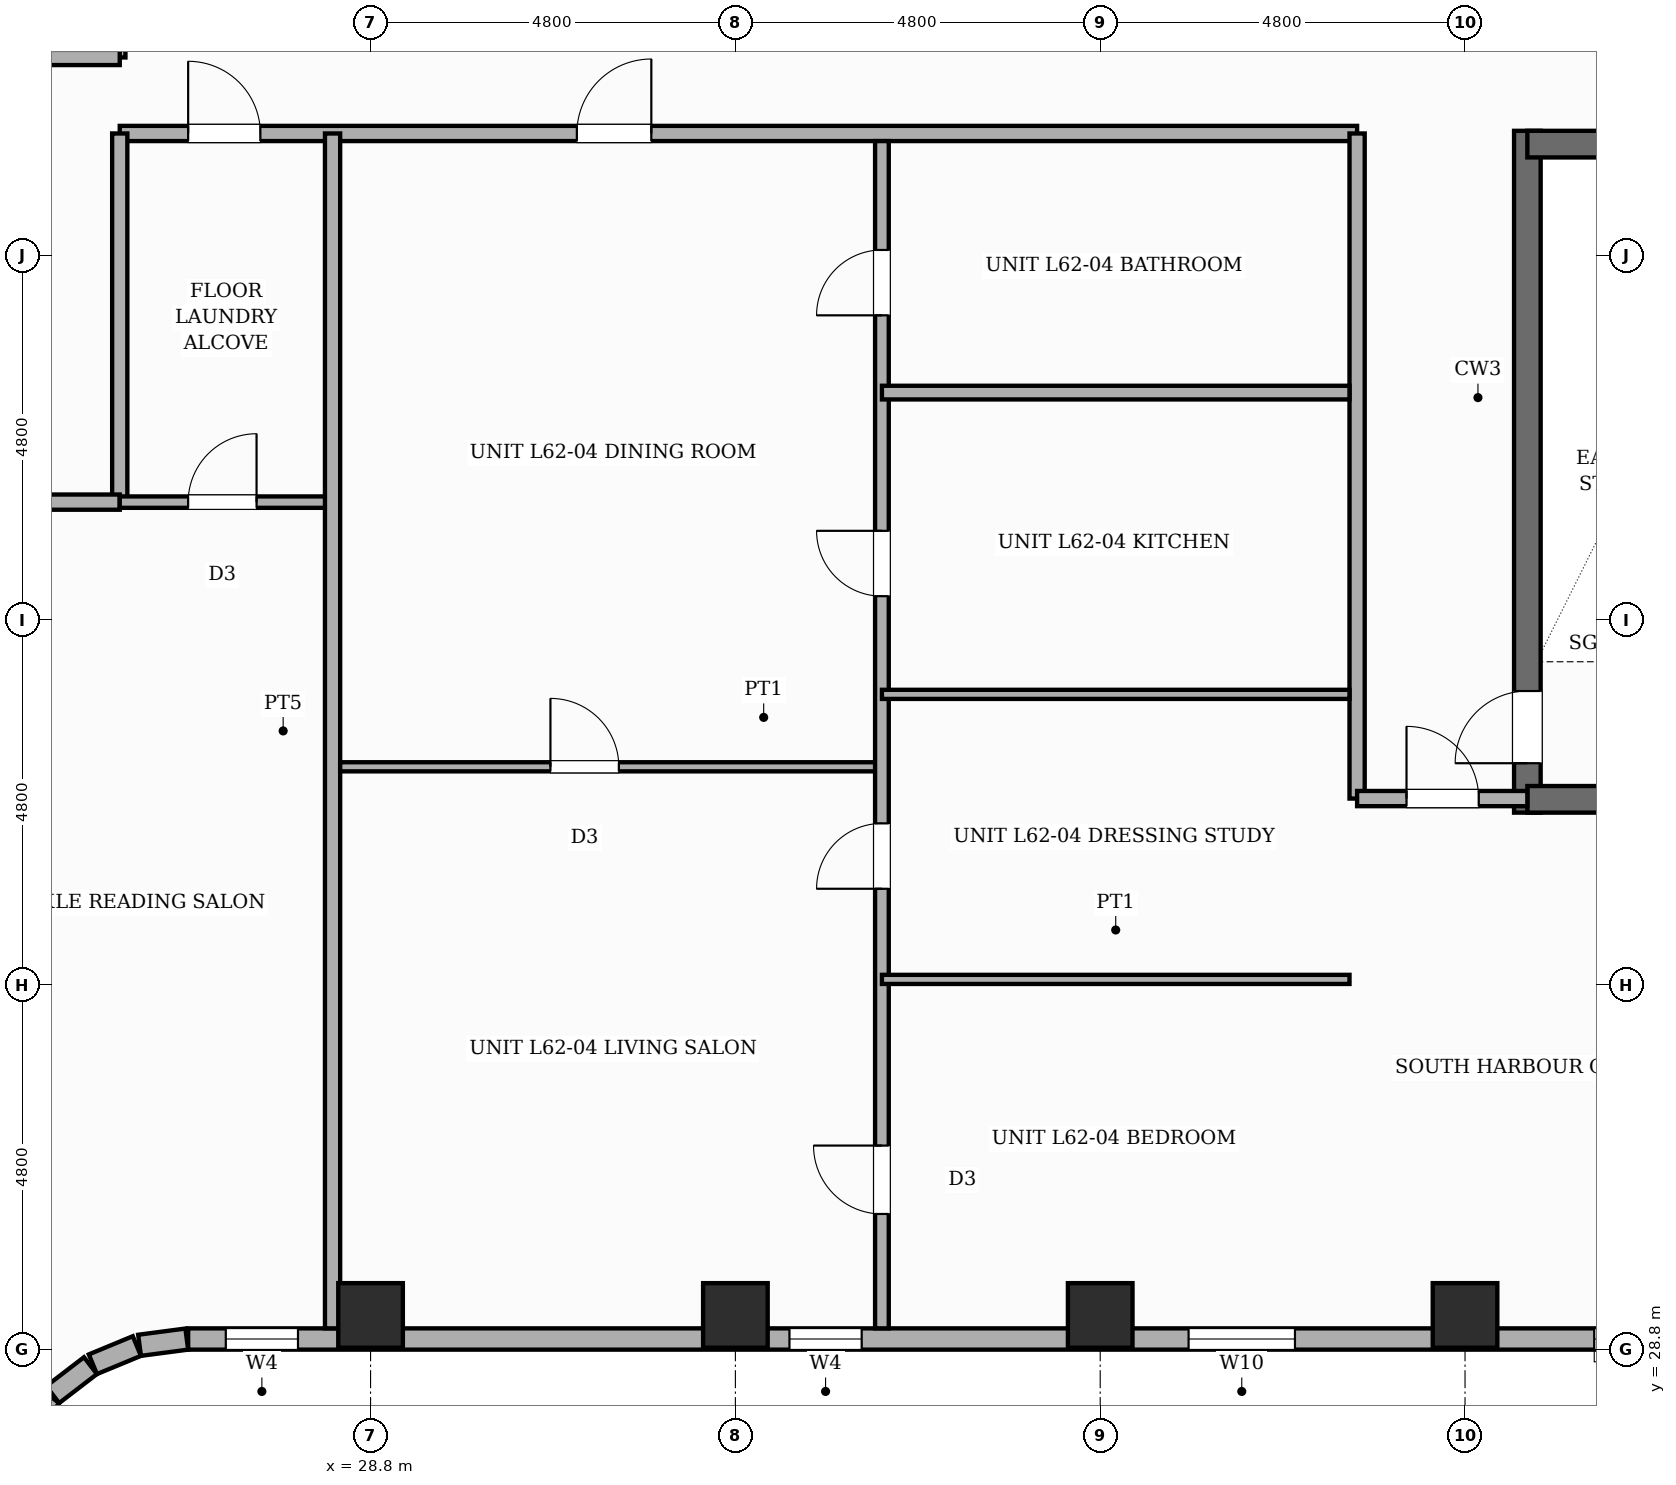
"""IFC4 building model, lengths in metres.
Left out: names, types, materials, properties, quantities, classifications, styles, units other than length and angle.
Written with IfcOpenShell. Run it as: python <this file> out.ifc"""

import sys

from ifc_helpers import new_model, si_unit, direction, frame, frame_2d, origin, origin_2d, place, context, subcontext, project, spatial, rectangle, extrude, element, fill, save


model = new_model("IFC4")
c1 = context("Model", 3, precision=1e-05, world=origin(), true_north=direction((0.0, 1.0)))
c2 = subcontext(c1, "Body", "Model", "MODEL_VIEW")
j1 = project(units=[si_unit("LENGTHUNIT", "METRE"), si_unit("PLANEANGLEUNIT", "RADIAN")], contexts=[c1])
p1 = place(None, origin())
s1 = spatial("IfcSite", under=j1, at=p1, CompositionType="ELEMENT")
p2 = place(p1, origin())
s2 = spatial("IfcBuilding", under=s1, at=p2, CompositionType="ELEMENT")
p3 = place(p2, frame((0.0, 0.0, 236.2)))
s3 = spatial("IfcBuildingStorey", under=s2, at=p3, CompositionType="ELEMENT", Elevation=236.2)
p4 = place(p3, frame((44.02, 35.865, 0.0), z_axis=(0.0, 0.0, 1.0), x_axis=(0.0, 1.0, 0.0)))
e1 = element("IfcWall", 1, at=p4, inside=s3, PredefinedType="SHEAR", context=c2, shape_type="SweptSolid", body=[
    extrude(rectangle(XDim=8.97, YDim=0.35, at=frame_2d((4.485, 0.0))), origin(), (0.0, 0.0, 1.0), 3.6),
])
p5 = place(p4, frame((0.65, 0.0, 0.0)))
e2 = element("IfcOpeningElement", 2, at=p5, cuts=e1, PredefinedType="OPENING", context=c2, shape_type="SweptSolid", body=[
    extrude(rectangle(XDim=0.95, YDim=2.1, at=frame_2d((0.475, 1.05))), frame((0.0, 0.185, 0.0), z_axis=(0.0, -1.0, 0.0), x_axis=(1.0, 0.0, 0.0)), (0.0, 0.0, 1.0), 0.37),
])
for number, where, z_axis, x_axis in (
    (3, (44.02, 36.04, 0.0), (0.0, 0.0, 1.0), (1.0, 0.0, 0.0)),
    (4, (44.02, 44.66, 0.0), (0.0, 0.0, 1.0), (1.0, 0.0, 0.0)),
):
    element("IfcWall", number, at=place(p3, frame(where, z_axis=z_axis, x_axis=x_axis)), inside=s3, PredefinedType="SHEAR", context=c2, shape_type="SweptSolid", body=[
        extrude(rectangle(XDim=3.58, YDim=0.35, at=frame_2d((1.79, 0.0))), origin(), (0.0, 0.0, 1.0), 3.6),
    ])
for number, where, z_axis, x_axis in (
    (5, (28.8, 29.25, 0.0), (0.0, 0.0, 1.0), (1.0, 0.0, 0.0)),
    (6, (33.6, 29.25, 0.0), (0.0, 0.0, 1.0), (1.0, 0.0, 0.0)),
    (7, (38.4, 29.25, 0.0), (0.0, 0.0, 1.0), (1.0, 0.0, 0.0)),
    (8, (43.2, 29.25, 0.0), (0.0, 0.0, 1.0), (1.0, 0.0, 0.0)),
):
    element("IfcColumn", number, at=place(p3, frame(where, z_axis=z_axis, x_axis=x_axis)), inside=s3, PredefinedType="COLUMN", context=c2, shape_type="SweptSolid", body=[
        extrude(rectangle(XDim=0.85, YDim=0.85, at=origin_2d()), origin(), (0.0, 0.0, 1.0), 3.6),
    ])
p6 = place(p3, frame((50.4, 28.94, 0.0), z_axis=(0.0, 0.0, 1.0), x_axis=(-1.0, 0.0, 0.0)))
e9 = element("IfcWall", 9, at=p6, inside=s3, PredefinedType="STANDARD", context=c2, shape_type="SweptSolid", body=[
    extrude(rectangle(XDim=24.0, YDim=0.28, at=frame_2d((12.0, 0.0))), origin(), (0.0, 0.0, 1.0), 2.6),
])
p7 = place(p6, frame((9.438, 0.0, 0.65)))
e10 = element("IfcOpeningElement", 10, at=p7, cuts=e9, PredefinedType="OPENING", context=c2, shape_type="SweptSolid", body=[
    extrude(rectangle(XDim=1.4, YDim=1.1, at=frame_2d((0.7, 0.55))), frame((0.0, 0.15, 0.0), z_axis=(0.0, -1.0, 0.0), x_axis=(1.0, 0.0, 0.0)), (0.0, 0.0, 1.0), 0.3),
])
p8 = place(p6, frame((22.555, 0.0, 0.45)))
e11 = element("IfcOpeningElement", 11, at=p8, cuts=e9, PredefinedType="OPENING", context=c2, shape_type="SweptSolid", body=[
    extrude(rectangle(XDim=0.95, YDim=1.8, at=frame_2d((0.475, 0.9))), frame((0.0, 0.15, 0.0), z_axis=(0.0, -1.0, 0.0), x_axis=(1.0, 0.0, 0.0)), (0.0, 0.0, 1.0), 0.3),
])
p9 = place(p6, frame((4.1, 0.0, 0.65)))
e12 = element("IfcOpeningElement", 12, at=p9, cuts=e9, PredefinedType="OPENING", context=c2, shape_type="SweptSolid", body=[
    extrude(rectangle(XDim=1.4, YDim=1.1, at=frame_2d((0.7, 0.55))), frame((0.0, 0.15, 0.0), z_axis=(0.0, -1.0, 0.0), x_axis=(1.0, 0.0, 0.0)), (0.0, 0.0, 1.0), 0.3),
])
p10 = place(p6, frame((15.138, 0.0, 0.45)))
e13 = element("IfcOpeningElement", 13, at=p10, cuts=e9, PredefinedType="OPENING", context=c2, shape_type="SweptSolid", body=[
    extrude(rectangle(XDim=0.95, YDim=1.8, at=frame_2d((0.475, 0.9))), frame((0.0, 0.15, 0.0), z_axis=(0.0, -1.0, 0.0), x_axis=(1.0, 0.0, 0.0)), (0.0, 0.0, 1.0), 0.3),
])
p11 = place(p6, frame((0.681, 0.0, 0.45)))
e14 = element("IfcOpeningElement", 14, at=p11, cuts=e9, PredefinedType="OPENING", context=c2, shape_type="SweptSolid", body=[
    extrude(rectangle(XDim=0.95, YDim=1.8, at=frame_2d((0.475, 0.9))), frame((0.0, 0.15, 0.0), z_axis=(0.0, -1.0, 0.0), x_axis=(1.0, 0.0, 0.0)), (0.0, 0.0, 1.0), 0.3),
])
p12 = place(p3, frame((26.382, 28.939, 0.0), z_axis=(0.0, 0.0, 1.0), x_axis=(-0.9914410257, -0.130555323746, 0.0)))
e15 = element("IfcWall", 15, at=p12, inside=s3, PredefinedType="STANDARD", context=c2, shape_type="SweptSolid", body=[
    extrude(rectangle(XDim=0.626, YDim=0.28, at=frame_2d((0.313, 0.0))), origin(), (0.0, 0.0, 1.0), 3.32),
])
p13 = place(p3, frame((25.725, 28.847, 0.0), z_axis=(0.0, 0.0, 1.0), x_axis=(-0.923974080304, -0.382455093999, 0.0)))
e16 = element("IfcWall", 16, at=p13, inside=s3, PredefinedType="STANDARD", context=c2, shape_type="SweptSolid", body=[
    extrude(rectangle(XDim=0.626, YDim=0.28, at=frame_2d((0.313, 0.0))), origin(), (0.0, 0.0, 1.0), 3.32),
])
for number, where, z_axis, x_axis in (
    (17, (25.115, 28.59, 0.0), (0.0, 0.0, 1.0), (-0.793, -0.609, 0.0)),
    (18, (24.592, 28.182, 0.0), (0.0, 0.0, 1.0), (-0.609, -0.793, 0.0)),
):
    element("IfcWall", number, at=place(p3, frame(where, z_axis=z_axis, x_axis=x_axis)), inside=s3, PredefinedType="STANDARD", context=c2, shape_type="SweptSolid", body=[
        extrude(rectangle(XDim=0.626, YDim=0.28, at=frame_2d((0.313, 0.0))), origin(), (0.0, 0.0, 1.0), 3.32),
    ])
p14 = place(p3, frame((25.5, 45.8, 0.0), z_axis=(0.0, 0.0, 1.0), x_axis=(0.0, 1.0, 0.0)))
e19 = element("IfcWall", 19, at=p14, inside=s3, PredefinedType="PARTITIONING", context=c2, shape_type="SweptSolid", body=[
    extrude(rectangle(XDim=1.92, YDim=0.15, at=frame_2d((0.96, 0.0))), origin(), (0.0, 0.0, 1.0), 3.32),
])
p15 = place(p14, frame((0.5, 0.0, 0.0)))
e20 = element("IfcOpeningElement", 20, at=p15, cuts=e19, PredefinedType="OPENING", context=c2, shape_type="SweptSolid", body=[
    extrude(rectangle(XDim=0.88, YDim=2.1, at=frame_2d((0.44, 1.05))), frame((0.0, 0.085, 0.0), z_axis=(0.0, -1.0, 0.0), x_axis=(1.0, 0.0, 0.0)), (0.0, 0.0, 1.0), 0.17),
])
p16 = place(p3, frame((22.75, 45.8, 0.0), z_axis=(0.0, 0.0, 1.0), x_axis=(1.0, 0.0, 0.0)))
e21 = element("IfcWall", 21, at=p16, inside=s3, PredefinedType="PARTITIONING", context=c2, shape_type="SweptSolid", body=[
    extrude(rectangle(XDim=2.75, YDim=0.2, at=frame_2d((1.375, 0.0))), origin(), (0.0, 0.0, 1.0), 3.32),
])
p17 = place(p3, frame((25.5, 44.8, 0.0), z_axis=(0.0, 0.0, 1.0), x_axis=(1.0, 0.0, 0.0)))
e22 = element("IfcWall", 22, at=p17, inside=s3, PredefinedType="PARTITIONING", context=c2, shape_type="SweptSolid", body=[
    extrude(rectangle(XDim=16.28, YDim=0.2, at=frame_2d((8.14, 0.0))), origin(), (0.0, 0.0, 1.0), 3.32),
])
p18 = place(p17, frame((0.9, 0.0, 0.0)))
e23 = element("IfcOpeningElement", 23, at=p18, cuts=e22, PredefinedType="OPENING", context=c2, shape_type="SweptSolid", body=[
    extrude(rectangle(XDim=0.95, YDim=2.15, at=frame_2d((0.475, 1.075))), frame((0.0, 0.11, 0.0), z_axis=(0.0, -1.0, 0.0), x_axis=(1.0, 0.0, 0.0)), (0.0, 0.0, 1.0), 0.22),
])
p19 = place(p17, frame((6.014, 0.0, 0.0)))
e24 = element("IfcOpeningElement", 24, at=p19, cuts=e22, PredefinedType="OPENING", context=c2, shape_type="SweptSolid", body=[
    extrude(rectangle(XDim=0.98, YDim=2.18, at=frame_2d((0.49, 1.09))), frame((0.0, 0.11, 0.0), z_axis=(0.0, -1.0, 0.0), x_axis=(1.0, 0.0, 0.0)), (0.0, 0.0, 1.0), 0.22),
])
p20 = place(p3, frame((25.5, 39.95, 0.0), z_axis=(0.0, 0.0, 1.0), x_axis=(0.0, 1.0, 0.0)))
e25 = element("IfcWall", 25, at=p20, inside=s3, PredefinedType="PARTITIONING", context=c2, shape_type="SweptSolid", body=[
    extrude(rectangle(XDim=4.85, YDim=0.2, at=frame_2d((2.425, 0.0))), origin(), (0.0, 0.0, 1.0), 3.32),
])
p21 = place(p3, frame((22.75, 39.95, 0.0), z_axis=(0.0, 0.0, 1.0), x_axis=(1.0, 0.0, 0.0)))
e26 = element("IfcWall", 26, at=p21, inside=s3, PredefinedType="PARTITIONING", context=c2, shape_type="SweptSolid", body=[
    extrude(rectangle(XDim=2.75, YDim=0.2, at=frame_2d((1.375, 0.0))), origin(), (0.0, 0.0, 1.0), 3.32),
])
p22 = place(p3, frame((41.78, 36.05, 0.0), z_axis=(0.0, 0.0, 1.0), x_axis=(0.0, 1.0, 0.0)))
e27 = element("IfcWall", 27, at=p22, inside=s3, PredefinedType="PARTITIONING", context=c2, shape_type="SweptSolid", body=[
    extrude(rectangle(XDim=8.75, YDim=0.2, at=frame_2d((4.375, 0.0))), origin(), (0.0, 0.0, 1.0), 3.32),
])
p23 = place(p3, frame((41.78, 36.05, 0.0), z_axis=(0.0, 0.0, 1.0), x_axis=(1.0, 0.0, 0.0)))
e28 = element("IfcWall", 28, at=p23, inside=s3, PredefinedType="PARTITIONING", context=c2, shape_type="SweptSolid", body=[
    extrude(rectangle(XDim=2.24, YDim=0.2, at=frame_2d((1.12, 0.0))), origin(), (0.0, 0.0, 1.0), 3.32),
])
p24 = place(p23, frame((0.65, 0.0, 0.0)))
e29 = element("IfcOpeningElement", 29, at=p24, cuts=e28, PredefinedType="OPENING", context=c2, shape_type="SweptSolid", body=[
    extrude(rectangle(XDim=0.95, YDim=2.15, at=frame_2d((0.475, 1.075))), frame((0.0, 0.11, 0.0), z_axis=(0.0, -1.0, 0.0), x_axis=(1.0, 0.0, 0.0)), (0.0, 0.0, 1.0), 0.22),
])
p25 = place(p3, frame((25.5, 39.95, 0.0), z_axis=(0.0, 0.0, 1.0), x_axis=(1.0, 0.0, 0.0)))
e30 = element("IfcWall", 30, at=p25, inside=s3, PredefinedType="PARTITIONING", context=c2, shape_type="SweptSolid", body=[
    extrude(rectangle(XDim=2.8, YDim=0.15, at=frame_2d((1.4, 0.0))), origin(), (0.0, 0.0, 1.0), 3.32),
])
p26 = place(p25, frame((0.9, 0.0, 0.0)))
e31 = element("IfcOpeningElement", 31, at=p26, cuts=e30, PredefinedType="OPENING", context=c2, shape_type="SweptSolid", body=[
    extrude(rectangle(XDim=0.9, YDim=2.15, at=frame_2d((0.45, 1.075))), frame((0.0, 0.085, 0.0), z_axis=(0.0, -1.0, 0.0), x_axis=(1.0, 0.0, 0.0)), (0.0, 0.0, 1.0), 0.17),
])
p27 = place(p3, frame((28.3, 29.08, 0.0), z_axis=(0.0, 0.0, 1.0), x_axis=(0.0, 1.0, 0.0)))
e32 = element("IfcWall", 32, at=p27, inside=s3, PredefinedType="SOLIDWALL", context=c2, shape_type="SweptSolid", body=[
    extrude(rectangle(XDim=15.72, YDim=0.2, at=frame_2d((7.86, 0.0))), origin(), (0.0, 0.0, 1.0), 3.32),
])
p28 = place(p3, frame((28.4, 36.468, 0.0), z_axis=(0.0, 0.0, 1.0), x_axis=(1.0, 0.0, 0.0)))
e33 = element("IfcWall", 33, at=p28, inside=s3, PredefinedType="PARTITIONING", context=c2, shape_type="SweptSolid", body=[
    extrude(rectangle(XDim=7.128, YDim=0.12, at=frame_2d((3.564, 0.0))), origin(), (0.0, 0.0, 1.0), 3.32),
])
p29 = place(p28, frame((2.767, 0.0, 0.0)))
e34 = element("IfcOpeningElement", 34, at=p29, cuts=e33, PredefinedType="OPENING", context=c2, shape_type="SweptSolid", body=[
    extrude(rectangle(XDim=0.9, YDim=2.15, at=frame_2d((0.45, 1.075))), frame((0.0, 0.07, 0.0), z_axis=(0.0, -1.0, 0.0), x_axis=(1.0, 0.0, 0.0)), (0.0, 0.0, 1.0), 0.14),
])
p30 = place(p3, frame((35.528, 29.08, 0.0), z_axis=(0.0, 0.0, 1.0), x_axis=(0.0, 1.0, 0.0)))
e35 = element("IfcWall", 35, at=p30, inside=s3, PredefinedType="PLUMBINGWALL", context=c2, shape_type="SweptSolid", body=[
    extrude(rectangle(XDim=15.62, YDim=0.18, at=frame_2d((7.81, 0.0))), origin(), (0.0, 0.0, 1.0), 3.32),
])
p31 = place(p30, frame((1.505, 0.0, 0.0)))
e36 = element("IfcOpeningElement", 36, at=p31, cuts=e35, PredefinedType="OPENING", context=c2, shape_type="SweptSolid", body=[
    extrude(rectangle(XDim=0.9, YDim=2.15, at=frame_2d((0.45, 1.075))), frame((0.0, 0.1, 0.0), z_axis=(0.0, -1.0, 0.0), x_axis=(1.0, 0.0, 0.0)), (0.0, 0.0, 1.0), 0.2),
])
p32 = place(p30, frame((5.783, 0.0, 0.0)))
e37 = element("IfcOpeningElement", 37, at=p32, cuts=e35, PredefinedType="OPENING", context=c2, shape_type="SweptSolid", body=[
    extrude(rectangle(XDim=0.86, YDim=2.1, at=frame_2d((0.43, 1.05))), frame((0.0, 0.1, 0.0), z_axis=(0.0, -1.0, 0.0), x_axis=(1.0, 0.0, 0.0)), (0.0, 0.0, 1.0), 0.2),
])
p33 = place(p30, frame((9.633, 0.0, 0.0)))
e38 = element("IfcOpeningElement", 38, at=p33, cuts=e35, PredefinedType="OPENING", context=c2, shape_type="SweptSolid", body=[
    extrude(rectangle(XDim=0.86, YDim=2.1, at=frame_2d((0.43, 1.05))), frame((0.0, 0.1, 0.0), z_axis=(0.0, -1.0, 0.0), x_axis=(1.0, 0.0, 0.0)), (0.0, 0.0, 1.0), 0.2),
])
p34 = place(p30, frame((13.327, 0.0, 0.0)))
e39 = element("IfcOpeningElement", 39, at=p34, cuts=e35, PredefinedType="OPENING", context=c2, shape_type="SweptSolid", body=[
    extrude(rectangle(XDim=0.86, YDim=2.1, at=frame_2d((0.43, 1.05))), frame((0.0, 0.1, 0.0), z_axis=(0.0, -1.0, 0.0), x_axis=(1.0, 0.0, 0.0)), (0.0, 0.0, 1.0), 0.2),
])
for number, where, z_axis, x_axis in (
    (40, (35.528, 33.671, 0.0), (0.0, 0.0, 1.0), (1.0, 0.0, 0.0)),
    (41, (35.528, 37.421, 0.0), (0.0, 0.0, 1.0), (1.0, 0.0, 0.0)),
):
    element("IfcWall", number, at=place(p3, frame(where, z_axis=z_axis, x_axis=x_axis)), inside=s3, PredefinedType="PARTITIONING", context=c2, shape_type="SweptSolid", body=[
        extrude(rectangle(XDim=6.152, YDim=0.12, at=frame_2d((3.076, 0.0))), origin(), (0.0, 0.0, 1.0), 3.32),
    ])
p35 = place(p3, frame((35.528, 41.391, 0.0), z_axis=(0.0, 0.0, 1.0), x_axis=(1.0, 0.0, 0.0)))
e42 = element("IfcWall", 42, at=p35, inside=s3, PredefinedType="PLUMBINGWALL", context=c2, shape_type="SweptSolid", body=[
    extrude(rectangle(XDim=6.152, YDim=0.18, at=frame_2d((3.076, 0.0))), origin(), (0.0, 0.0, 1.0), 3.32),
])
p36 = place(p7, origin())
e43 = element("IfcWindow", 43, at=p36, inside=s3, PartitioningType="SINGLE_PANEL", PredefinedType="WINDOW", context=c2, shape_type="SweptSolid", body=[
    extrude(rectangle(XDim=1.4, YDim=1.1, at=frame_2d((0.7, 0.55))), frame((0.0, 0.03, 0.0), z_axis=(0.0, -1.0, 0.0), x_axis=(1.0, 0.0, 0.0)), (0.0, 0.0, 1.0), 0.06),
])
fill(e10, e43)
p37 = place(p8, origin())
e44 = element("IfcWindow", 44, at=p37, inside=s3, PartitioningType="SINGLE_PANEL", PredefinedType="WINDOW", context=c2, shape_type="SweptSolid", body=[
    extrude(rectangle(XDim=0.95, YDim=1.8, at=frame_2d((0.475, 0.9))), frame((0.0, 0.03, 0.0), z_axis=(0.0, -1.0, 0.0), x_axis=(1.0, 0.0, 0.0)), (0.0, 0.0, 1.0), 0.06),
])
fill(e11, e44)
p38 = place(p9, origin())
e45 = element("IfcWindow", 45, at=p38, inside=s3, PartitioningType="SINGLE_PANEL", PredefinedType="WINDOW", context=c2, shape_type="SweptSolid", body=[
    extrude(rectangle(XDim=1.4, YDim=1.1, at=frame_2d((0.7, 0.55))), frame((0.0, 0.03, 0.0), z_axis=(0.0, -1.0, 0.0), x_axis=(1.0, 0.0, 0.0)), (0.0, 0.0, 1.0), 0.06),
])
fill(e12, e45)
p39 = place(p10, origin())
e46 = element("IfcWindow", 46, at=p39, inside=s3, PartitioningType="SINGLE_PANEL", PredefinedType="WINDOW", context=c2, shape_type="SweptSolid", body=[
    extrude(rectangle(XDim=0.95, YDim=1.8, at=frame_2d((0.475, 0.9))), frame((0.0, 0.03, 0.0), z_axis=(0.0, -1.0, 0.0), x_axis=(1.0, 0.0, 0.0)), (0.0, 0.0, 1.0), 0.06),
])
fill(e13, e46)
p40 = place(p5, origin())
e47 = element("IfcDoor", 47, at=p40, inside=s3, OperationType="SINGLE_SWING_LEFT", PredefinedType="DOOR", context=c2, shape_type="SweptSolid", body=[
    extrude(rectangle(XDim=0.95, YDim=2.1, at=frame_2d((0.475, 1.05))), frame((0.0, 0.025, 0.0), z_axis=(0.0, -1.0, 0.0), x_axis=(1.0, 0.0, 0.0)), (0.0, 0.0, 1.0), 0.05),
])
fill(e2, e47)
p41 = place(p18, origin())
e48 = element("IfcDoor", 48, at=p41, inside=s3, OperationType="SINGLE_SWING_LEFT", PredefinedType="DOOR", context=c2, shape_type="SweptSolid", body=[
    extrude(rectangle(XDim=0.95, YDim=2.15, at=frame_2d((0.475, 1.075))), frame((0.0, 0.025, 0.0), z_axis=(0.0, -1.0, 0.0), x_axis=(1.0, 0.0, 0.0)), (0.0, 0.0, 1.0), 0.05),
])
fill(e23, e48)
p42 = place(p26, origin())
e49 = element("IfcDoor", 49, at=p42, inside=s3, OperationType="SINGLE_SWING_RIGHT", PredefinedType="DOOR", context=c2, shape_type="SweptSolid", body=[
    extrude(rectangle(XDim=0.9, YDim=2.15, at=frame_2d((0.45, 1.075))), frame((0.0, 0.025, 0.0), z_axis=(0.0, -1.0, 0.0), x_axis=(1.0, 0.0, 0.0)), (0.0, 0.0, 1.0), 0.05),
])
fill(e31, e49)
p43 = place(p19, origin())
e50 = element("IfcDoor", 50, at=p43, inside=s3, OperationType="SINGLE_SWING_RIGHT", PredefinedType="DOOR", context=c2, shape_type="SweptSolid", body=[
    extrude(rectangle(XDim=0.98, YDim=2.18, at=frame_2d((0.49, 1.09))), frame((0.0, 0.025, 0.0), z_axis=(0.0, -1.0, 0.0), x_axis=(1.0, 0.0, 0.0)), (0.0, 0.0, 1.0), 0.05),
])
fill(e24, e50)
p44 = place(p29, origin())
e51 = element("IfcDoor", 51, at=p44, inside=s3, OperationType="SINGLE_SWING_LEFT", PredefinedType="DOOR", context=c2, shape_type="SweptSolid", body=[
    extrude(rectangle(XDim=0.9, YDim=2.15, at=frame_2d((0.45, 1.075))), frame((0.0, 0.025, 0.0), z_axis=(0.0, -1.0, 0.0), x_axis=(1.0, 0.0, 0.0)), (0.0, 0.0, 1.0), 0.05),
])
fill(e34, e51)
p45 = place(p31, origin())
e52 = element("IfcDoor", 52, at=p45, inside=s3, OperationType="SINGLE_SWING_RIGHT", PredefinedType="DOOR", context=c2, shape_type="SweptSolid", body=[
    extrude(rectangle(XDim=0.9, YDim=2.15, at=frame_2d((0.45, 1.075))), frame((0.0, 0.025, 0.0), z_axis=(0.0, -1.0, 0.0), x_axis=(1.0, 0.0, 0.0)), (0.0, 0.0, 1.0), 0.05),
])
fill(e36, e52)
p46 = place(p32, origin())
e53 = element("IfcDoor", 53, at=p46, inside=s3, OperationType="SINGLE_SWING_LEFT", PredefinedType="DOOR", context=c2, shape_type="SweptSolid", body=[
    extrude(rectangle(XDim=0.86, YDim=2.1, at=frame_2d((0.43, 1.05))), frame((0.0, 0.025, 0.0), z_axis=(0.0, -1.0, 0.0), x_axis=(1.0, 0.0, 0.0)), (0.0, 0.0, 1.0), 0.05),
])
fill(e37, e53)
p47 = place(p33, origin())
e54 = element("IfcDoor", 54, at=p47, inside=s3, OperationType="SINGLE_SWING_RIGHT", PredefinedType="DOOR", context=c2, shape_type="SweptSolid", body=[
    extrude(rectangle(XDim=0.86, YDim=2.1, at=frame_2d((0.43, 1.05))), frame((0.0, 0.025, 0.0), z_axis=(0.0, -1.0, 0.0), x_axis=(1.0, 0.0, 0.0)), (0.0, 0.0, 1.0), 0.05),
])
fill(e38, e54)
p48 = place(p34, origin())
e55 = element("IfcDoor", 55, at=p48, inside=s3, OperationType="SINGLE_SWING_LEFT", PredefinedType="DOOR", context=c2, shape_type="SweptSolid", body=[
    extrude(rectangle(XDim=0.86, YDim=2.1, at=frame_2d((0.43, 1.05))), frame((0.0, 0.025, 0.0), z_axis=(0.0, -1.0, 0.0), x_axis=(1.0, 0.0, 0.0)), (0.0, 0.0, 1.0), 0.05),
])
fill(e39, e55)
p49 = place(p24, origin())
e56 = element("IfcDoor", 56, at=p49, inside=s3, OperationType="SINGLE_SWING_LEFT", PredefinedType="DOOR", context=c2, shape_type="SweptSolid", body=[
    extrude(rectangle(XDim=0.95, YDim=2.15, at=frame_2d((0.475, 1.075))), frame((0.0, 0.025, 0.0), z_axis=(0.0, -1.0, 0.0), x_axis=(1.0, 0.0, 0.0)), (0.0, 0.0, 1.0), 0.05),
])
fill(e29, e56)
save(model, sys.argv[1])
